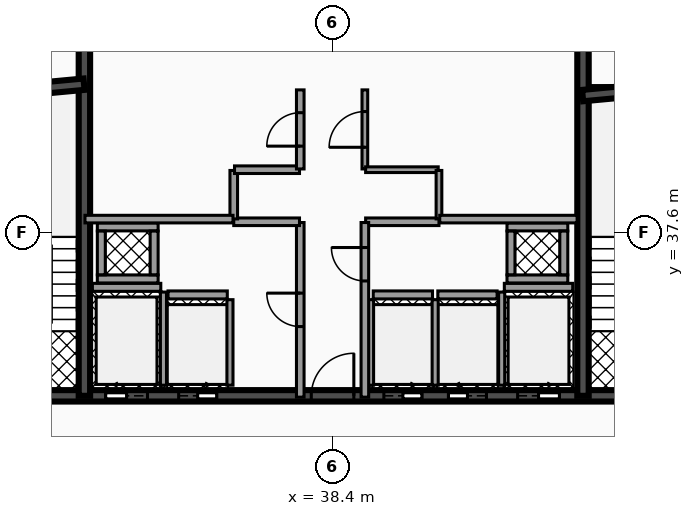
"""IFC4 building model, lengths in metres.
Left out: names, types, materials, properties, quantities, classifications, styles, units other than length and angle.
Written with IfcOpenShell. Run it as: python <this file> out.ifc"""

import sys

from ifc_helpers import new_model, si_unit, direction, frame, frame_2d, origin, place, context, subcontext, project, spatial, rectangle, extrude, element, fill, save


model = new_model("IFC4")
c1 = context("Model", 3, precision=1e-05, world=origin(), true_north=direction((0.0, 1.0)))
c2 = subcontext(c1, "Body", "Model", "MODEL_VIEW")
j1 = project(units=[si_unit("LENGTHUNIT", "METRE"), si_unit("PLANEANGLEUNIT", "RADIAN")], contexts=[c1])
p1 = place(None, origin())
s1 = spatial("IfcSite", under=j1, at=p1, CompositionType="ELEMENT")
p2 = place(p1, origin())
s2 = spatial("IfcBuilding", under=s1, at=p2, CompositionType="ELEMENT")
p3 = place(p2, frame((0.0, 0.0, 282.2)))
s3 = spatial("IfcBuildingStorey", under=s2, at=p3, CompositionType="ELEMENT", Elevation=282.2)
p4 = place(p3, frame((28.5, 33.3, 0.0), z_axis=(0.0, 0.0, 1.0), x_axis=(1.0, 0.0, 0.0)))
e1 = element("IfcWall", 1, at=p4, inside=s3, PredefinedType="SHEAR", context=c2, shape_type="SweptSolid", body=[
    extrude(rectangle(XDim=19.86, YDim=0.3, at=frame_2d((9.93, 0.0))), origin(), (0.0, 0.0, 1.0), 3.18),
])
p5 = place(p4, frame((3.93, 0.0, 0.0)))
e2 = element("IfcOpeningElement", 2, at=p5, cuts=e1, PredefinedType="OPENING", context=c2, shape_type="SweptSolid", body=[
    extrude(rectangle(XDim=1.1, YDim=2.15, at=frame_2d((0.55, 1.075))), frame((0.0, 0.16, 0.0), z_axis=(0.0, -1.0, 0.0), x_axis=(1.0, 0.0, 0.0)), (0.0, 0.0, 1.0), 0.32),
])
p6 = place(p4, frame((14.77, 0.0, 0.0)))
e3 = element("IfcOpeningElement", 3, at=p6, cuts=e1, PredefinedType="OPENING", context=c2, shape_type="SweptSolid", body=[
    extrude(rectangle(XDim=1.1, YDim=2.15, at=frame_2d((0.55, 1.075))), frame((0.0, 0.16, 0.0), z_axis=(0.0, -1.0, 0.0), x_axis=(1.0, 0.0, 0.0)), (0.0, 0.0, 1.0), 0.32),
])
p7 = place(p4, frame((11.25, 0.0, 0.0)))
e4 = element("IfcOpeningElement", 4, at=p7, cuts=e1, PredefinedType="OPENING", context=c2, shape_type="SweptSolid", body=[
    extrude(rectangle(XDim=1.0, YDim=2.1, at=frame_2d((0.5, 1.05))), frame((0.0, 0.16, 0.0), z_axis=(0.0, -1.0, 0.0), x_axis=(1.0, 0.0, 0.0)), (0.0, 0.0, 1.0), 0.32),
])
p8 = place(p4, frame((12.95, 0.0, 0.0)))
e5 = element("IfcOpeningElement", 5, at=p8, cuts=e1, PredefinedType="OPENING", context=c2, shape_type="SweptSolid", body=[
    extrude(rectangle(XDim=1.0, YDim=2.1, at=frame_2d((0.5, 1.05))), frame((0.0, 0.16, 0.0), z_axis=(0.0, -1.0, 0.0), x_axis=(1.0, 0.0, 0.0)), (0.0, 0.0, 1.0), 0.32),
])
p9 = place(p4, frame((5.85, 0.0, 0.0)))
e6 = element("IfcOpeningElement", 6, at=p9, cuts=e1, PredefinedType="OPENING", context=c2, shape_type="SweptSolid", body=[
    extrude(rectangle(XDim=1.0, YDim=2.1, at=frame_2d((0.5, 1.05))), frame((0.0, 0.16, 0.0), z_axis=(0.0, -1.0, 0.0), x_axis=(1.0, 0.0, 0.0)), (0.0, 0.0, 1.0), 0.32),
])
p10 = place(p4, frame((1.21, 0.0, 0.0)))
e7 = element("IfcOpeningElement", 7, at=p10, cuts=e1, PredefinedType="OPENING", context=c2, shape_type="SweptSolid", body=[
    extrude(rectangle(XDim=1.1, YDim=2.2, at=frame_2d((0.55, 1.1))), frame((0.0, 0.16, 0.0), z_axis=(0.0, -1.0, 0.0), x_axis=(1.0, 0.0, 0.0)), (0.0, 0.0, 1.0), 0.32),
])
p11 = place(p4, frame((9.34, 0.0, 0.0)))
e8 = element("IfcOpeningElement", 8, at=p11, cuts=e1, PredefinedType="OPENING", context=c2, shape_type="SweptSolid", body=[
    extrude(rectangle(XDim=1.12, YDim=2.05, at=frame_2d((0.56, 1.025))), frame((0.0, 0.16, 0.0), z_axis=(0.0, -1.0, 0.0), x_axis=(1.0, 0.0, 0.0)), (0.0, 0.0, 1.0), 0.32),
])
p12 = place(p4, frame((17.55, 0.0, 0.0)))
e9 = element("IfcOpeningElement", 9, at=p12, cuts=e1, PredefinedType="OPENING", context=c2, shape_type="SweptSolid", body=[
    extrude(rectangle(XDim=1.1, YDim=2.2, at=frame_2d((0.55, 1.1))), frame((0.0, 0.16, 0.0), z_axis=(0.0, -1.0, 0.0), x_axis=(1.0, 0.0, 0.0)), (0.0, 0.0, 1.0), 0.32),
])
for number, where, z_axis, x_axis in (
    (10, (31.87, 33.3, 0.0), (0.0, 0.0, 1.0), (0.0, 1.0, 0.0)),
    (11, (44.99, 33.3, 0.0), (0.0, 0.0, 1.0), (0.0, 1.0, 0.0)),
):
    element("IfcWall", number, at=place(p3, frame(where, z_axis=z_axis, x_axis=x_axis)), inside=s3, PredefinedType="SHEAR", context=c2, shape_type="SweptSolid", body=[
        extrude(rectangle(XDim=10.1, YDim=0.3, at=frame_2d((5.05, 0.0))), origin(), (0.0, 0.0, 1.0), 3.18),
    ])
p13 = place(p3, frame((28.64, 41.2, 0.0), z_axis=(0.0, 0.0, 1.0), x_axis=(0.995687118776, 0.092774789157, 0.0)))
e12 = element("IfcWall", 12, at=p13, inside=s3, PredefinedType="SHEAR", context=c2, shape_type="SweptSolid", body=[
    extrude(rectangle(XDim=3.234, YDim=0.3, at=frame_2d((1.617, 0.0))), origin(), (0.0, 0.0, 1.0), 3.18),
])
p14 = place(p3, frame((44.98, 41.2, 0.0), z_axis=(0.0, 0.0, 1.0), x_axis=(0.995686468965, 0.09278176286, 0.0)))
e13 = element("IfcWall", 13, at=p14, inside=s3, PredefinedType="SHEAR", context=c2, shape_type="SweptSolid", body=[
    extrude(rectangle(XDim=3.234, YDim=0.3, at=frame_2d((1.617, 0.0))), origin(), (0.0, 0.0, 1.0), 3.18),
])
p15 = place(p3, frame((32.08, 36.155, 0.0), z_axis=(0.0, 0.0, 1.0), x_axis=(1.0, 0.0, 0.0)))
e14 = element("IfcWall", 14, at=p15, inside=s3, PredefinedType="SOLIDWALL", context=c2, shape_type="SweptSolid", body=[
    extrude(rectangle(XDim=1.8, YDim=0.21, at=frame_2d((0.9, 0.0))), origin(), (0.0, 0.0, 1.0), 3.18),
])
p16 = place(p3, frame((33.95, 33.58, 0.0), z_axis=(0.0, 0.0, 1.0), x_axis=(0.0, 1.0, 0.0)))
e15 = element("IfcWall", 15, at=p16, inside=s3, PredefinedType="SOLIDWALL", context=c2, shape_type="SweptSolid", body=[
    extrude(rectangle(XDim=2.45, YDim=0.16, at=frame_2d((1.225, 0.0))), origin(), (0.0, 0.0, 1.0), 3.18),
])
p17 = place(p3, frame((42.92, 36.155, 0.0), z_axis=(0.0, 0.0, 1.0), x_axis=(1.0, 0.0, 0.0)))
e16 = element("IfcWall", 16, at=p17, inside=s3, PredefinedType="SOLIDWALL", context=c2, shape_type="SweptSolid", body=[
    extrude(rectangle(XDim=1.8, YDim=0.21, at=frame_2d((0.9, 0.0))), origin(), (0.0, 0.0, 1.0), 3.18),
])
p18 = place(p3, frame((42.85, 33.58, 0.0), z_axis=(0.0, 0.0, 1.0), x_axis=(0.0, 1.0, 0.0)))
e17 = element("IfcWall", 17, at=p18, inside=s3, PredefinedType="SOLIDWALL", context=c2, shape_type="SweptSolid", body=[
    extrude(rectangle(XDim=2.45, YDim=0.16, at=frame_2d((1.225, 0.0))), origin(), (0.0, 0.0, 1.0), 3.18),
])
p19 = place(p3, frame((39.47, 35.955, 0.0), z_axis=(0.0, 0.0, 1.0), x_axis=(1.0, 0.0, 0.0)))
e18 = element("IfcWall", 18, at=p19, inside=s3, PredefinedType="SOLIDWALL", context=c2, shape_type="SweptSolid", body=[
    extrude(rectangle(XDim=1.56, YDim=0.21, at=frame_2d((0.78, 0.0))), origin(), (0.0, 0.0, 1.0), 3.18),
])
for number, where, z_axis, x_axis in (
    (19, (39.4, 33.58, 0.0), (0.0, 0.0, 1.0), (0.0, 1.0, 0.0)),
    (20, (41.1, 33.58, 0.0), (0.0, 0.0, 1.0), (0.0, 1.0, 0.0)),
):
    element("IfcWall", number, at=place(p3, frame(where, z_axis=z_axis, x_axis=x_axis)), inside=s3, PredefinedType="SOLIDWALL", context=c2, shape_type="SweptSolid", body=[
        extrude(rectangle(XDim=2.25, YDim=0.16, at=frame_2d((1.125, 0.0))), origin(), (0.0, 0.0, 1.0), 3.18),
    ])
p20 = place(p3, frame((41.17, 35.955, 0.0), z_axis=(0.0, 0.0, 1.0), x_axis=(1.0, 0.0, 0.0)))
e21 = element("IfcWall", 21, at=p20, inside=s3, PredefinedType="SOLIDWALL", context=c2, shape_type="SweptSolid", body=[
    extrude(rectangle(XDim=1.56, YDim=0.21, at=frame_2d((0.78, 0.0))), origin(), (0.0, 0.0, 1.0), 3.18),
])
p21 = place(p3, frame((34.07, 35.955, 0.0), z_axis=(0.0, 0.0, 1.0), x_axis=(1.0, 0.0, 0.0)))
e22 = element("IfcWall", 22, at=p21, inside=s3, PredefinedType="SOLIDWALL", context=c2, shape_type="SweptSolid", body=[
    extrude(rectangle(XDim=1.56, YDim=0.21, at=frame_2d((0.78, 0.0))), origin(), (0.0, 0.0, 1.0), 3.18),
])
p22 = place(p3, frame((35.7, 33.58, 0.0), z_axis=(0.0, 0.0, 1.0), x_axis=(0.0, 1.0, 0.0)))
e23 = element("IfcWall", 23, at=p22, inside=s3, PredefinedType="SOLIDWALL", context=c2, shape_type="SweptSolid", body=[
    extrude(rectangle(XDim=2.25, YDim=0.16, at=frame_2d((1.125, 0.0))), origin(), (0.0, 0.0, 1.0), 3.18),
])
for number, where, z_axis, x_axis in (
    (24, (32.21, 36.375, 0.0), (0.0, 0.0, 1.0), (1.0, 0.0, 0.0)),
    (25, (32.21, 37.745, 0.0), (0.0, 0.0, 1.0), (1.0, 0.0, 0.0)),
):
    element("IfcWall", number, at=place(p3, frame(where, z_axis=z_axis, x_axis=x_axis)), inside=s3, PredefinedType="SOLIDWALL", context=c2, shape_type="SweptSolid", body=[
        extrude(rectangle(XDim=1.6, YDim=0.21, at=frame_2d((0.8, 0.0))), origin(), (0.0, 0.0, 1.0), 3.18),
    ])
for number, where, z_axis, x_axis in (
    (26, (32.315, 36.485, 0.0), (0.0, 0.0, 1.0), (0.0, 1.0, 0.0)),
    (27, (33.705, 36.485, 0.0), (0.0, 0.0, 1.0), (0.0, 1.0, 0.0)),
):
    element("IfcWall", number, at=place(p3, frame(where, z_axis=z_axis, x_axis=x_axis)), inside=s3, PredefinedType="SOLIDWALL", context=c2, shape_type="SweptSolid", body=[
        extrude(rectangle(XDim=1.15, YDim=0.21, at=frame_2d((0.575, 0.0))), origin(), (0.0, 0.0, 1.0), 3.18),
    ])
for number, where, z_axis, x_axis in (
    (28, (42.99, 36.375, 0.0), (0.0, 0.0, 1.0), (1.0, 0.0, 0.0)),
    (29, (42.99, 37.745, 0.0), (0.0, 0.0, 1.0), (1.0, 0.0, 0.0)),
):
    element("IfcWall", number, at=place(p3, frame(where, z_axis=z_axis, x_axis=x_axis)), inside=s3, PredefinedType="SOLIDWALL", context=c2, shape_type="SweptSolid", body=[
        extrude(rectangle(XDim=1.6, YDim=0.21, at=frame_2d((0.8, 0.0))), origin(), (0.0, 0.0, 1.0), 3.18),
    ])
for number, where, z_axis, x_axis in (
    (30, (43.095, 36.485, 0.0), (0.0, 0.0, 1.0), (0.0, 1.0, 0.0)),
    (31, (44.485, 36.485, 0.0), (0.0, 0.0, 1.0), (0.0, 1.0, 0.0)),
):
    element("IfcWall", number, at=place(p3, frame(where, z_axis=z_axis, x_axis=x_axis)), inside=s3, PredefinedType="SOLIDWALL", context=c2, shape_type="SweptSolid", body=[
        extrude(rectangle(XDim=1.15, YDim=0.21, at=frame_2d((0.575, 0.0))), origin(), (0.0, 0.0, 1.0), 3.18),
    ])
p23 = place(p3, frame((37.55, 33.265, 0.0), z_axis=(0.0, 0.0, 1.0), x_axis=(0.0, 1.0, 0.0)))
e32 = element("IfcWall", 32, at=p23, inside=s3, PredefinedType="PARTITIONING", context=c2, shape_type="SweptSolid", body=[
    extrude(rectangle(XDim=4.595, YDim=0.2, at=frame_2d((2.298, 0.0))), origin(), (0.0, 0.0, 1.0), 2.235),
])
p24 = place(p23, frame((1.857, 0.0, 0.0)))
e33 = element("IfcOpeningElement", 33, at=p24, cuts=e32, PredefinedType="OPENING", context=c2, shape_type="SweptSolid", body=[
    extrude(rectangle(XDim=0.88, YDim=2.05, at=frame_2d((0.44, 1.025))), frame((0.0, 0.11, 0.0), z_axis=(0.0, -1.0, 0.0), x_axis=(1.0, 0.0, 0.0)), (0.0, 0.0, 1.0), 0.22),
])
p25 = place(p3, frame((35.8, 37.88, 0.0), z_axis=(0.0, 0.0, 1.0), x_axis=(1.0, 0.0, 0.0)))
e34 = element("IfcWall", 34, at=p25, inside=s3, PredefinedType="PARTITIONING", context=c2, shape_type="SweptSolid", body=[
    extrude(rectangle(XDim=1.73, YDim=0.2, at=frame_2d((0.865, 0.0))), origin(), (0.0, 0.0, 1.0), 2.235),
])
p26 = place(p3, frame((35.8, 37.955, 0.0), z_axis=(0.0, 0.0, 1.0), x_axis=(0.0, 1.0, 0.0)))
e35 = element("IfcWall", 35, at=p26, inside=s3, PredefinedType="PARTITIONING", context=c2, shape_type="SweptSolid", body=[
    extrude(rectangle(XDim=1.275, YDim=0.2, at=frame_2d((0.637, 0.0))), origin(), (0.0, 0.0, 1.0), 2.235),
])
p27 = place(p3, frame((35.82, 39.25, 0.0), z_axis=(0.0, 0.0, 1.0), x_axis=(1.0, 0.0, 0.0)))
e36 = element("IfcWall", 36, at=p27, inside=s3, PredefinedType="PARTITIONING", context=c2, shape_type="SweptSolid", body=[
    extrude(rectangle(XDim=1.71, YDim=0.2, at=frame_2d((0.855, 0.0))), origin(), (0.0, 0.0, 1.0), 2.235),
])
p28 = place(p3, frame((37.55, 39.27, 0.0), z_axis=(0.0, 0.0, 1.0), x_axis=(0.0, 1.0, 0.0)))
e37 = element("IfcWall", 37, at=p28, inside=s3, PredefinedType="PARTITIONING", context=c2, shape_type="SweptSolid", body=[
    extrude(rectangle(XDim=2.08, YDim=0.2, at=frame_2d((1.04, 0.0))), origin(), (0.0, 0.0, 1.0), 2.235),
])
p29 = place(p28, frame((0.6, 0.0, 0.0)))
e38 = element("IfcOpeningElement", 38, at=p29, cuts=e37, PredefinedType="OPENING", context=c2, shape_type="SweptSolid", body=[
    extrude(rectangle(XDim=0.88, YDim=2.05, at=frame_2d((0.44, 1.025))), frame((0.0, 0.11, 0.0), z_axis=(0.0, -1.0, 0.0), x_axis=(1.0, 0.0, 0.0)), (0.0, 0.0, 1.0), 0.22),
])
p30 = place(p3, frame((39.27, 37.88, 0.0), z_axis=(0.0, 0.0, 1.0), x_axis=(1.0, 0.0, 0.0)))
e39 = element("IfcWall", 39, at=p30, inside=s3, PredefinedType="PARTITIONING", context=c2, shape_type="SweptSolid", body=[
    extrude(rectangle(XDim=1.93, YDim=0.2, at=frame_2d((0.965, 0.0))), origin(), (0.0, 0.0, 1.0), 2.235),
])
p31 = place(p3, frame((39.25, 33.265, 0.0), z_axis=(0.0, 0.0, 1.0), x_axis=(0.0, 1.0, 0.0)))
e40 = element("IfcWall", 40, at=p31, inside=s3, PredefinedType="PARTITIONING", context=c2, shape_type="SweptSolid", body=[
    extrude(rectangle(XDim=4.595, YDim=0.2, at=frame_2d((2.298, 0.0))), origin(), (0.0, 0.0, 1.0), 2.235),
])
p32 = place(p31, frame((3.058, 0.0, 0.0)))
e41 = element("IfcOpeningElement", 41, at=p32, cuts=e40, PredefinedType="OPENING", context=c2, shape_type="SweptSolid", body=[
    extrude(rectangle(XDim=0.88, YDim=2.05, at=frame_2d((0.44, 1.025))), frame((0.0, 0.11, 0.0), z_axis=(0.0, -1.0, 0.0), x_axis=(1.0, 0.0, 0.0)), (0.0, 0.0, 1.0), 0.22),
])
p33 = place(p3, frame((39.25, 39.27, 0.0), z_axis=(0.0, 0.0, 1.0), x_axis=(0.0, 1.0, 0.0)))
e42 = element("IfcWall", 42, at=p33, inside=s3, PredefinedType="PARTITIONING", context=c2, shape_type="SweptSolid", body=[
    extrude(rectangle(XDim=2.08, YDim=0.15, at=frame_2d((1.04, 0.0))), origin(), (0.0, 0.0, 1.0), 2.235),
])
p34 = place(p33, frame((0.57, 0.0, 0.0)))
e43 = element("IfcOpeningElement", 43, at=p34, cuts=e42, PredefinedType="OPENING", context=c2, shape_type="SweptSolid", body=[
    extrude(rectangle(XDim=0.94, YDim=2.05, at=frame_2d((0.47, 1.025))), frame((0.0, 0.085, 0.0), z_axis=(0.0, -1.0, 0.0), x_axis=(1.0, 0.0, 0.0)), (0.0, 0.0, 1.0), 0.17),
])
p35 = place(p3, frame((39.27, 39.25, 0.0), z_axis=(0.0, 0.0, 1.0), x_axis=(1.0, 0.0, 0.0)))
e44 = element("IfcWall", 44, at=p35, inside=s3, PredefinedType="PARTITIONING", context=c2, shape_type="SweptSolid", body=[
    extrude(rectangle(XDim=1.91, YDim=0.15, at=frame_2d((0.955, 0.0))), origin(), (0.0, 0.0, 1.0), 2.235),
])
p36 = place(p3, frame((41.2, 37.955, 0.0), z_axis=(0.0, 0.0, 1.0), x_axis=(0.0, 1.0, 0.0)))
e45 = element("IfcWall", 45, at=p36, inside=s3, PredefinedType="PARTITIONING", context=c2, shape_type="SweptSolid", body=[
    extrude(rectangle(XDim=1.275, YDim=0.15, at=frame_2d((0.637, 0.0))), origin(), (0.0, 0.0, 1.0), 2.235),
])
p37 = place(p3, frame((31.885, 37.95, 0.0), z_axis=(0.0, 0.0, 1.0), x_axis=(1.0, 0.0, 0.0)))
e46 = element("IfcWall", 46, at=p37, inside=s3, PredefinedType="PARTITIONING", context=c2, shape_type="SweptSolid", body=[
    extrude(rectangle(XDim=3.895, YDim=0.2, at=frame_2d((1.948, 0.0))), origin(), (0.0, 0.0, 1.0), 2.235),
])
p38 = place(p3, frame((41.22, 37.95, 0.0), z_axis=(0.0, 0.0, 1.0), x_axis=(1.0, 0.0, 0.0)))
e47 = element("IfcWall", 47, at=p38, inside=s3, PredefinedType="PARTITIONING", context=c2, shape_type="SweptSolid", body=[
    extrude(rectangle(XDim=3.615, YDim=0.2, at=frame_2d((1.808, 0.0))), origin(), (0.0, 0.0, 1.0), 2.235),
])
p39 = place(p5, origin())
e48 = element("IfcDoor", 48, at=p39, inside=s3, OperationType="SLIDING_TO_LEFT", PredefinedType="DOOR", context=c2, shape_type="SweptSolid", body=[
    extrude(rectangle(XDim=1.1, YDim=2.15, at=frame_2d((0.55, 1.075))), frame((0.0, 0.025, 0.0), z_axis=(0.0, -1.0, 0.0), x_axis=(1.0, 0.0, 0.0)), (0.0, 0.0, 1.0), 0.05),
])
fill(e2, e48)
p40 = place(p6, origin())
e49 = element("IfcDoor", 49, at=p40, inside=s3, OperationType="SLIDING_TO_RIGHT", PredefinedType="DOOR", context=c2, shape_type="SweptSolid", body=[
    extrude(rectangle(XDim=1.1, YDim=2.15, at=frame_2d((0.55, 1.075))), frame((0.0, 0.025, 0.0), z_axis=(0.0, -1.0, 0.0), x_axis=(1.0, 0.0, 0.0)), (0.0, 0.0, 1.0), 0.05),
])
fill(e3, e49)
p41 = place(p7, origin())
e50 = element("IfcDoor", 50, at=p41, inside=s3, OperationType="SLIDING_TO_RIGHT", PredefinedType="DOOR", context=c2, shape_type="SweptSolid", body=[
    extrude(rectangle(XDim=1.0, YDim=2.1, at=frame_2d((0.5, 1.05))), frame((0.0, 0.025, 0.0), z_axis=(0.0, -1.0, 0.0), x_axis=(1.0, 0.0, 0.0)), (0.0, 0.0, 1.0), 0.05),
])
fill(e4, e50)
p42 = place(p8, origin())
e51 = element("IfcDoor", 51, at=p42, inside=s3, OperationType="SLIDING_TO_LEFT", PredefinedType="DOOR", context=c2, shape_type="SweptSolid", body=[
    extrude(rectangle(XDim=1.0, YDim=2.1, at=frame_2d((0.5, 1.05))), frame((0.0, 0.025, 0.0), z_axis=(0.0, -1.0, 0.0), x_axis=(1.0, 0.0, 0.0)), (0.0, 0.0, 1.0), 0.05),
])
fill(e5, e51)
p43 = place(p9, origin())
e52 = element("IfcDoor", 52, at=p43, inside=s3, OperationType="SLIDING_TO_RIGHT", PredefinedType="DOOR", context=c2, shape_type="SweptSolid", body=[
    extrude(rectangle(XDim=1.0, YDim=2.1, at=frame_2d((0.5, 1.05))), frame((0.0, 0.025, 0.0), z_axis=(0.0, -1.0, 0.0), x_axis=(1.0, 0.0, 0.0)), (0.0, 0.0, 1.0), 0.05),
])
fill(e6, e52)
p44 = place(p11, origin())
e53 = element("IfcDoor", 53, at=p44, inside=s3, OperationType="SINGLE_SWING_RIGHT", PredefinedType="DOOR", context=c2, shape_type="SweptSolid", body=[
    extrude(rectangle(XDim=1.12, YDim=2.05, at=frame_2d((0.56, 1.025))), frame((0.0, 0.025, 0.0), z_axis=(0.0, -1.0, 0.0), x_axis=(1.0, 0.0, 0.0)), (0.0, 0.0, 1.0), 0.05),
])
fill(e8, e53)
p45 = place(p24, origin())
e54 = element("IfcDoor", 54, at=p45, inside=s3, OperationType="SINGLE_SWING_RIGHT", PredefinedType="DOOR", context=c2, shape_type="SweptSolid", body=[
    extrude(rectangle(XDim=0.88, YDim=2.05, at=frame_2d((0.44, 1.025))), frame((0.0, 0.025, 0.0), z_axis=(0.0, -1.0, 0.0), x_axis=(1.0, 0.0, 0.0)), (0.0, 0.0, 1.0), 0.05),
])
fill(e33, e54)
p46 = place(p29, origin())
e55 = element("IfcDoor", 55, at=p46, inside=s3, OperationType="SINGLE_SWING_LEFT", PredefinedType="DOOR", context=c2, shape_type="SweptSolid", body=[
    extrude(rectangle(XDim=0.88, YDim=2.05, at=frame_2d((0.44, 1.025))), frame((0.0, 0.025, 0.0), z_axis=(0.0, -1.0, 0.0), x_axis=(1.0, 0.0, 0.0)), (0.0, 0.0, 1.0), 0.05),
])
fill(e38, e55)
p47 = place(p32, origin())
e56 = element("IfcDoor", 56, at=p47, inside=s3, OperationType="SINGLE_SWING_RIGHT", PredefinedType="DOOR", context=c2, shape_type="SweptSolid", body=[
    extrude(rectangle(XDim=0.88, YDim=2.05, at=frame_2d((0.44, 1.025))), frame((0.0, 0.025, 0.0), z_axis=(0.0, -1.0, 0.0), x_axis=(1.0, 0.0, 0.0)), (0.0, 0.0, 1.0), 0.05),
])
fill(e41, e56)
p48 = place(p34, origin())
e57 = element("IfcDoor", 57, at=p48, inside=s3, OperationType="SINGLE_SWING_LEFT", PredefinedType="DOOR", context=c2, shape_type="SweptSolid", body=[
    extrude(rectangle(XDim=0.94, YDim=2.05, at=frame_2d((0.47, 1.025))), frame((0.0, 0.025, 0.0), z_axis=(0.0, -1.0, 0.0), x_axis=(1.0, 0.0, 0.0)), (0.0, 0.0, 1.0), 0.05),
])
fill(e43, e57)
save(model, sys.argv[1])
